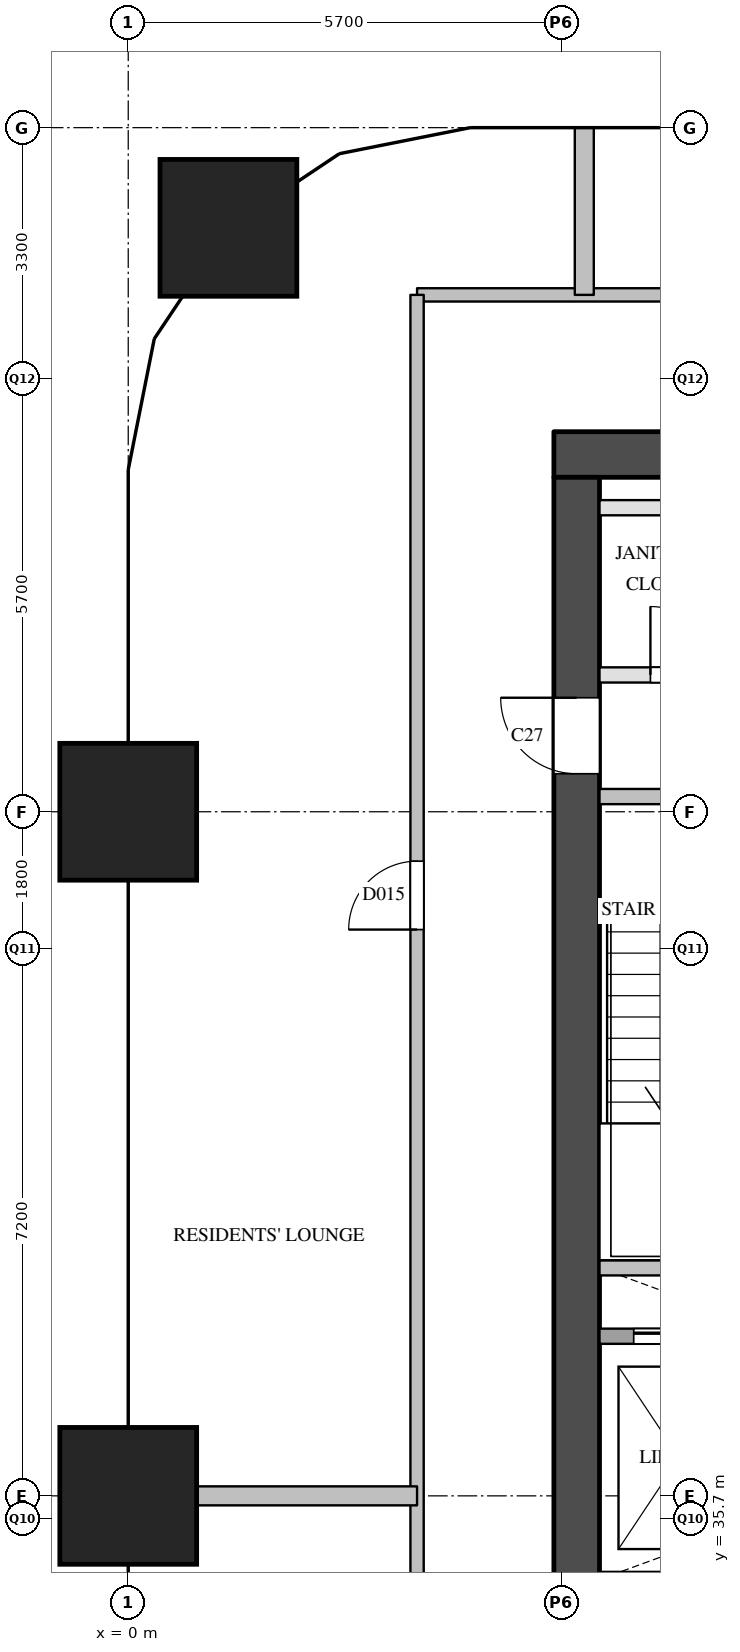
"""IFC4 building model, lengths in metres.
Left out: names, types, materials, properties, quantities, classifications, styles, units other than length and angle.
Written with IfcOpenShell. Run it as: python <this file> out.ifc"""

import sys

from ifc_helpers import new_model, si_unit, direction, frame, frame_2d, origin, origin_2d, place, context, subcontext, project, spatial, rectangle, extrude, element, fill, save


model = new_model("IFC4")
c1 = context("Model", 3, precision=1e-05, world=origin(), true_north=direction((0.0, 1.0)))
c2 = subcontext(c1, "Body", "Model", "MODEL_VIEW")
j1 = project(units=[si_unit("LENGTHUNIT", "METRE"), si_unit("PLANEANGLEUNIT", "RADIAN")], contexts=[c1])
p1 = place(None, origin())
s1 = spatial("IfcSite", under=j1, at=p1, CompositionType="ELEMENT")
p2 = place(p1, origin())
s2 = spatial("IfcBuilding", under=s1, at=p2, CompositionType="ELEMENT")
p3 = place(p2, frame((0.0, 0.0, 115.8)))
s3 = spatial("IfcBuildingStorey", under=s2, at=p3, CompositionType="ELEMENT", Elevation=115.8)
for number, where, z_axis, x_axis in (
    (1, (0.0, 36.0, 0.0), (0.0, 0.0, 1.0), (1.0, 0.0, 0.0)),
    (2, (0.0, 45.0, 0.0), (0.0, 0.0, 1.0), (1.0, 0.0, 0.0)),
    (3, (1.318, 52.682, 0.0), (0.0, 0.0, 1.0), (1.0, 0.0, 0.0)),
):
    element("IfcColumn", number, at=place(p3, frame(where, z_axis=z_axis, x_axis=x_axis)), inside=s3, PredefinedType="COLUMN", context=c2, shape_type="SweptSolid", body=[
        extrude(rectangle(XDim=1.8, YDim=1.8, at=origin_2d()), origin(), (0.0, 0.0, 1.0), 3.8),
    ])
p4 = place(p3, frame((5.6, 49.7, 0.0), z_axis=(0.0, 0.0, 1.0), x_axis=(1.0, 0.0, 0.0)))
e4 = element("IfcWall", 4, at=p4, inside=s3, PredefinedType="SHEAR", context=c2, shape_type="SweptSolid", body=[
    extrude(rectangle(XDim=12.4, YDim=0.6, at=frame_2d((6.2, 0.0))), origin(), (0.0, 0.0, 1.0), 3.5),
])
p5 = place(p3, frame((5.9, 29.1, 0.0), z_axis=(0.0, 0.0, 1.0), x_axis=(0.0, 1.0, 0.0)))
e5 = element("IfcWall", 5, at=p5, inside=s3, PredefinedType="SHEAR", context=c2, shape_type="SweptSolid", body=[
    extrude(rectangle(XDim=20.3, YDim=0.6, at=frame_2d((10.15, 0.0))), origin(), (0.0, 0.0, 1.0), 3.5),
])
p6 = place(p5, frame((3.6, 0.0, 0.0)))
e6 = element("IfcOpeningElement", 6, at=p6, cuts=e5, PredefinedType="OPENING", context=c2, shape_type="SweptSolid", body=[
    extrude(rectangle(XDim=1.8, YDim=2.1, at=frame_2d((0.9, 1.05))), frame((0.0, 0.31, 0.0), z_axis=(0.0, -1.0, 0.0), x_axis=(1.0, 0.0, 0.0)), (0.0, 0.0, 1.0), 0.62),
])
p7 = place(p5, frame((16.4, 0.0, 0.0)))
e7 = element("IfcOpeningElement", 7, at=p7, cuts=e5, PredefinedType="OPENING", context=c2, shape_type="SweptSolid", body=[
    extrude(rectangle(XDim=1.0, YDim=2.1, at=frame_2d((0.5, 1.05))), frame((0.0, 0.31, 0.0), z_axis=(0.0, -1.0, 0.0), x_axis=(1.0, 0.0, 0.0)), (0.0, 0.0, 1.0), 0.62),
])
p8 = place(p3, frame((6.2, 38.1, 0.0), z_axis=(0.0, 0.0, 1.0), x_axis=(1.0, 0.0, 0.0)))
e8 = element("IfcWall", 8, at=p8, inside=s3, PredefinedType="SOLIDWALL", context=c2, shape_type="SweptSolid", body=[
    extrude(rectangle(XDim=11.2, YDim=0.2, at=frame_2d((5.6, 0.0))), origin(), (0.0, 0.0, 1.0), 3.5),
])
p9 = place(p8, frame((0.45, 0.0, 0.0)))
e9 = element("IfcOpeningElement", 9, at=p9, cuts=e8, PredefinedType="OPENING", context=c2, shape_type="SweptSolid", body=[
    extrude(rectangle(XDim=1.2, YDim=2.1, at=frame_2d((0.6, 1.05))), frame((0.0, 0.11, 0.0), z_axis=(0.0, -1.0, 0.0), x_axis=(1.0, 0.0, 0.0)), (0.0, 0.0, 1.0), 0.22),
])
p10 = place(p8, frame((2.55, 0.0, 0.0)))
e10 = element("IfcOpeningElement", 10, at=p10, cuts=e8, PredefinedType="OPENING", context=c2, shape_type="SweptSolid", body=[
    extrude(rectangle(XDim=1.2, YDim=2.1, at=frame_2d((0.6, 1.05))), frame((0.0, 0.11, 0.0), z_axis=(0.0, -1.0, 0.0), x_axis=(1.0, 0.0, 0.0)), (0.0, 0.0, 1.0), 0.22),
])
p11 = place(p8, frame((4.65, 0.0, 0.0)))
e11 = element("IfcOpeningElement", 11, at=p11, cuts=e8, PredefinedType="OPENING", context=c2, shape_type="SweptSolid", body=[
    extrude(rectangle(XDim=1.2, YDim=2.1, at=frame_2d((0.6, 1.05))), frame((0.0, 0.11, 0.0), z_axis=(0.0, -1.0, 0.0), x_axis=(1.0, 0.0, 0.0)), (0.0, 0.0, 1.0), 0.22),
])
p12 = place(p8, frame((6.75, 0.0, 0.0)))
e12 = element("IfcOpeningElement", 12, at=p12, cuts=e8, PredefinedType="OPENING", context=c2, shape_type="SweptSolid", body=[
    extrude(rectangle(XDim=1.2, YDim=2.1, at=frame_2d((0.6, 1.05))), frame((0.0, 0.11, 0.0), z_axis=(0.0, -1.0, 0.0), x_axis=(1.0, 0.0, 0.0)), (0.0, 0.0, 1.0), 0.22),
])
p13 = place(p3, frame((6.2, 39.0, 0.0), z_axis=(0.0, 0.0, 1.0), x_axis=(1.0, 0.0, 0.0)))
e13 = element("IfcWall", 13, at=p13, inside=s3, PredefinedType="SOLIDWALL", context=c2, shape_type="SweptSolid", body=[
    extrude(rectangle(XDim=3.05, YDim=0.2, at=frame_2d((1.525, 0.0))), origin(), (0.0, 0.0, 1.0), 3.5),
])
p14 = place(p3, frame((6.2, 45.2, 0.0), z_axis=(0.0, 0.0, 1.0), x_axis=(1.0, 0.0, 0.0)))
e14 = element("IfcWall", 14, at=p14, inside=s3, PredefinedType="SOLIDWALL", context=c2, shape_type="SweptSolid", body=[
    extrude(rectangle(XDim=6.3, YDim=0.2, at=frame_2d((3.15, 0.0))), origin(), (0.0, 0.0, 1.0), 3.5),
])
p15 = place(p14, frame((1.025, 0.0, 0.0)))
e15 = element("IfcOpeningElement", 15, at=p15, cuts=e14, PredefinedType="OPENING", context=c2, shape_type="SweptSolid", body=[
    extrude(rectangle(XDim=1.1, YDim=2.1, at=frame_2d((0.55, 1.05))), frame((0.0, 0.11, 0.0), z_axis=(0.0, -1.0, 0.0), x_axis=(1.0, 0.0, 0.0)), (0.0, 0.0, 1.0), 0.22),
])
p16 = place(p14, frame((4.175, 0.0, 0.0)))
e16 = element("IfcOpeningElement", 16, at=p16, cuts=e14, PredefinedType="OPENING", context=c2, shape_type="SweptSolid", body=[
    extrude(rectangle(XDim=1.1, YDim=2.1, at=frame_2d((0.55, 1.05))), frame((0.0, 0.11, 0.0), z_axis=(0.0, -1.0, 0.0), x_axis=(1.0, 0.0, 0.0)), (0.0, 0.0, 1.0), 0.22),
])
p17 = place(p3, frame((6.2, 46.8, 0.0), z_axis=(0.0, 0.0, 1.0), x_axis=(1.0, 0.0, 0.0)))
e17 = element("IfcWall", 17, at=p17, inside=s3, PredefinedType="PARTITIONING", context=c2, shape_type="SweptSolid", body=[
    extrude(rectangle(XDim=11.2, YDim=0.2, at=frame_2d((5.6, 0.0))), origin(), (0.0, 0.0, 1.0), 3.5),
])
p18 = place(p17, frame((0.67, 0.0, 0.0)))
e18 = element("IfcOpeningElement", 18, at=p18, cuts=e17, PredefinedType="OPENING", context=c2, shape_type="SweptSolid", body=[
    extrude(rectangle(XDim=0.9, YDim=2.1, at=frame_2d((0.45, 1.05))), frame((0.0, 0.11, 0.0), z_axis=(0.0, -1.0, 0.0), x_axis=(1.0, 0.0, 0.0)), (0.0, 0.0, 1.0), 0.22),
])
p19 = place(p17, frame((4.59, 0.0, 0.0)))
e19 = element("IfcOpeningElement", 19, at=p19, cuts=e17, PredefinedType="OPENING", context=c2, shape_type="SweptSolid", body=[
    extrude(rectangle(XDim=0.9, YDim=2.1, at=frame_2d((0.45, 1.05))), frame((0.0, 0.11, 0.0), z_axis=(0.0, -1.0, 0.0), x_axis=(1.0, 0.0, 0.0)), (0.0, 0.0, 1.0), 0.22),
])
p20 = place(p17, frame((9.07, 0.0, 0.0)))
e20 = element("IfcOpeningElement", 20, at=p20, cuts=e17, PredefinedType="OPENING", context=c2, shape_type="SweptSolid", body=[
    extrude(rectangle(XDim=0.9, YDim=2.1, at=frame_2d((0.45, 1.05))), frame((0.0, 0.11, 0.0), z_axis=(0.0, -1.0, 0.0), x_axis=(1.0, 0.0, 0.0)), (0.0, 0.0, 1.0), 0.22),
])
p21 = place(p3, frame((6.2, 49.0, 0.0), z_axis=(0.0, 0.0, 1.0), x_axis=(1.0, 0.0, 0.0)))
e21 = element("IfcWall", 21, at=p21, inside=s3, PredefinedType="PARTITIONING", context=c2, shape_type="SweptSolid", body=[
    extrude(rectangle(XDim=11.2, YDim=0.2, at=frame_2d((5.6, 0.0))), origin(), (0.0, 0.0, 1.0), 3.5),
])
p22 = place(p3, frame((3.8, 51.8, 0.0), z_axis=(0.0, 0.0, 1.0), x_axis=(1.0, 0.0, 0.0)))
e22 = element("IfcWall", 22, at=p22, inside=s3, PredefinedType="PARTITIONING", context=c2, shape_type="SweptSolid", body=[
    extrude(rectangle(XDim=16.0, YDim=0.175, at=frame_2d((8.0, 0.0))), origin(), (0.0, 0.0, 1.0), 3.5),
])
p23 = place(p22, frame((7.75, 0.0, 0.0)))
e23 = element("IfcOpeningElement", 23, at=p23, cuts=e22, PredefinedType="OPENING", context=c2, shape_type="SweptSolid", body=[
    extrude(rectangle(XDim=0.9, YDim=2.1, at=frame_2d((0.45, 1.05))), frame((0.0, 0.097, 0.0), z_axis=(0.0, -1.0, 0.0), x_axis=(1.0, 0.0, 0.0)), (0.0, 0.0, 1.0), 0.195),
])
p24 = place(p3, frame((3.8, 28.5, 0.0), z_axis=(0.0, 0.0, 1.0), x_axis=(0.0, 1.0, 0.0)))
e24 = element("IfcWall", 24, at=p24, inside=s3, PredefinedType="PARTITIONING", context=c2, shape_type="SweptSolid", body=[
    extrude(rectangle(XDim=23.3, YDim=0.175, at=frame_2d((11.65, 0.0))), origin(), (0.0, 0.0, 1.0), 3.5),
])
p25 = place(p24, frame((3.3, 0.0, 0.0)))
e25 = element("IfcOpeningElement", 25, at=p25, cuts=e24, PredefinedType="OPENING", context=c2, shape_type="SweptSolid", body=[
    extrude(rectangle(XDim=0.9, YDim=2.1, at=frame_2d((0.45, 1.05))), frame((0.0, 0.097, 0.0), z_axis=(0.0, -1.0, 0.0), x_axis=(1.0, 0.0, 0.0)), (0.0, 0.0, 1.0), 0.195),
])
p26 = place(p24, frame((14.95, 0.0, 0.0)))
e26 = element("IfcOpeningElement", 26, at=p26, cuts=e24, PredefinedType="OPENING", context=c2, shape_type="SweptSolid", body=[
    extrude(rectangle(XDim=0.9, YDim=2.1, at=frame_2d((0.45, 1.05))), frame((0.0, 0.097, 0.0), z_axis=(0.0, -1.0, 0.0), x_axis=(1.0, 0.0, 0.0)), (0.0, 0.0, 1.0), 0.195),
])
p27 = place(p3, frame((0.0, 36.0, 0.0), z_axis=(0.0, 0.0, 1.0), x_axis=(1.0, 0.0, 0.0)))
e27 = element("IfcWall", 27, at=p27, inside=s3, PredefinedType="PARTITIONING", context=c2, shape_type="SweptSolid", body=[
    extrude(rectangle(XDim=3.8, YDim=0.25, at=frame_2d((1.9, 0.0))), origin(), (0.0, 0.0, 1.0), 3.5),
])
p28 = place(p3, frame((6.0, 51.8, 0.0), z_axis=(0.0, 0.0, 1.0), x_axis=(0.0, 1.0, 0.0)))
e28 = element("IfcWall", 28, at=p28, inside=s3, PredefinedType="PARTITIONING", context=c2, shape_type="SweptSolid", body=[
    extrude(rectangle(XDim=2.2, YDim=0.25, at=frame_2d((1.1, 0.0))), origin(), (0.0, 0.0, 1.0), 2.5),
])
p29 = place(p9, origin())
e29 = element("IfcDoor", 29, at=p29, inside=s3, OperationType="SLIDING_TO_LEFT", PredefinedType="DOOR", context=c2, shape_type="SweptSolid", body=[
    extrude(rectangle(XDim=1.2, YDim=2.1, at=frame_2d((0.6, 1.05))), frame((0.0, 0.025, 0.0), z_axis=(0.0, -1.0, 0.0), x_axis=(1.0, 0.0, 0.0)), (0.0, 0.0, 1.0), 0.05),
])
fill(e9, e29)
p30 = place(p7, origin())
e30 = element("IfcDoor", 30, at=p30, inside=s3, OperationType="SINGLE_SWING_RIGHT", PredefinedType="DOOR", context=c2, shape_type="SweptSolid", body=[
    extrude(rectangle(XDim=1.0, YDim=2.1, at=frame_2d((0.5, 1.05))), frame((0.0, 0.025, 0.0), z_axis=(0.0, -1.0, 0.0), x_axis=(1.0, 0.0, 0.0)), (0.0, 0.0, 1.0), 0.05),
])
fill(e7, e30)
p31 = place(p18, origin())
e31 = element("IfcDoor", 31, at=p31, inside=s3, OperationType="SINGLE_SWING_LEFT", PredefinedType="DOOR", context=c2, shape_type="SweptSolid", body=[
    extrude(rectangle(XDim=0.9, YDim=2.1, at=frame_2d((0.45, 1.05))), frame((0.0, 0.025, 0.0), z_axis=(0.0, -1.0, 0.0), x_axis=(1.0, 0.0, 0.0)), (0.0, 0.0, 1.0), 0.05),
])
fill(e18, e31)
p32 = place(p26, origin())
e32 = element("IfcDoor", 32, at=p32, inside=s3, OperationType="SINGLE_SWING_LEFT", PredefinedType="DOOR", context=c2, shape_type="SweptSolid", body=[
    extrude(rectangle(XDim=0.9, YDim=2.1, at=frame_2d((0.45, 1.05))), frame((0.0, 0.025, 0.0), z_axis=(0.0, -1.0, 0.0), x_axis=(1.0, 0.0, 0.0)), (0.0, 0.0, 1.0), 0.05),
])
fill(e26, e32)
save(model, sys.argv[1])
